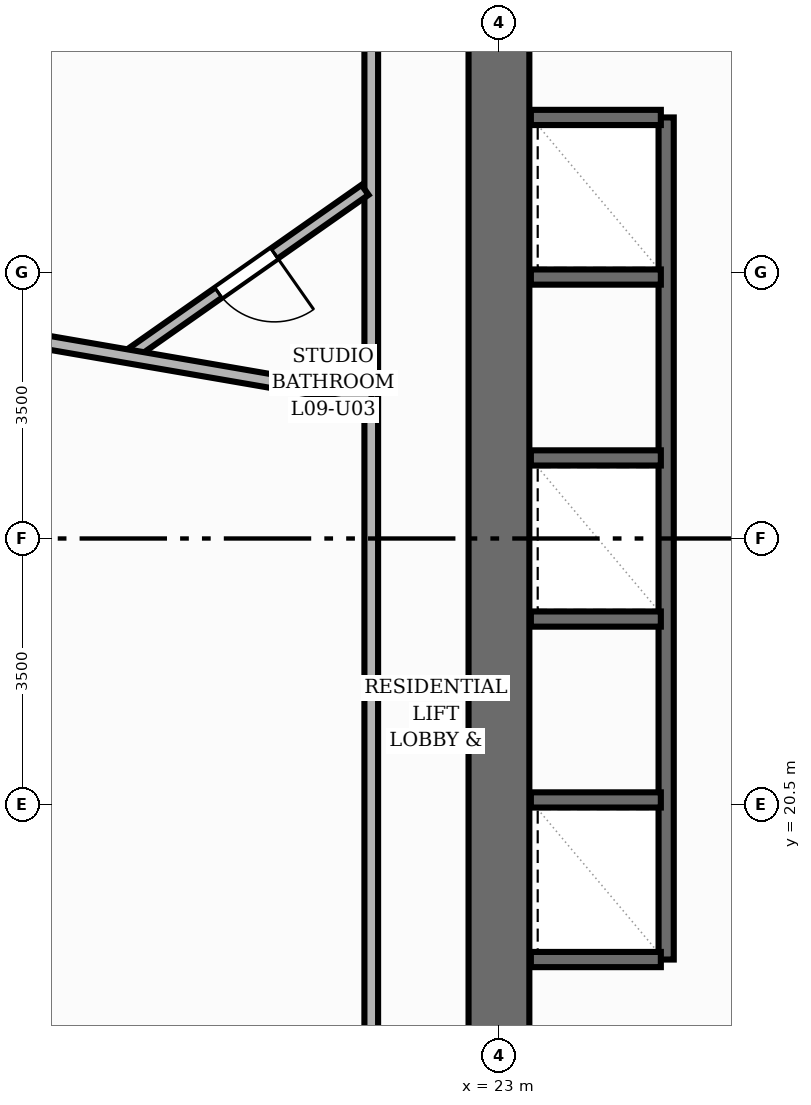
"""IFC4 building model, lengths in metres.
Left out: names, types, materials, properties, quantities, classifications, styles, units other than length and angle.
Written with IfcOpenShell. Run it as: python <this file> out.ifc"""

import sys

from ifc_helpers import new_model, si_unit, direction, frame, frame_2d, origin, place, context, subcontext, project, spatial, rectangle, extrude, element, fill, save


model = new_model("IFC4")
c1 = context("Model", 3, precision=1e-05, world=origin(), true_north=direction((0.0, 1.0)))
c2 = subcontext(c1, "Body", "Model", "MODEL_VIEW")
j1 = project(units=[si_unit("LENGTHUNIT", "METRE"), si_unit("PLANEANGLEUNIT", "RADIAN")], contexts=[c1])
p1 = place(None, origin())
s1 = spatial("IfcSite", under=j1, at=p1, CompositionType="ELEMENT")
p2 = place(p1, origin())
s2 = spatial("IfcBuilding", under=s1, at=p2, CompositionType="ELEMENT")
p3 = place(p2, frame((0.0, 0.0, 34.4)))
s3 = spatial("IfcBuildingStorey", under=s2, at=p3, CompositionType="ELEMENT", Elevation=34.4)
p4 = place(p3, frame((23.0, 17.4, 0.0), z_axis=(0.0, 0.0, 1.0), x_axis=(0.0, 1.0, 0.0)))
e1 = element("IfcWall", 1, at=p4, inside=s3, PredefinedType="SHEAR", context=c2, shape_type="SweptSolid", body=[
    extrude(rectangle(XDim=13.2, YDim=0.8, at=frame_2d((6.6, 0.0))), origin(), (0.0, 0.0, 1.0), 3.2),
])
p5 = place(p3, frame((25.2, 18.46, 0.0), z_axis=(0.0, 0.0, 1.0), x_axis=(0.0, 1.0, 0.0)))
e2 = element("IfcWall", 2, at=p5, inside=s3, PredefinedType="SHEAR", context=c2, shape_type="SweptSolid", body=[
    extrude(rectangle(XDim=11.08, YDim=0.2, at=frame_2d((5.54, 0.0))), origin(), (0.0, 0.0, 1.0), 3.2),
])
for number, where, z_axis, x_axis in (
    (3, (23.42, 18.46, 0.0), (0.0, 0.0, 1.0), (1.0, 0.0, 0.0)),
    (4, (23.42, 29.54, 0.0), (0.0, 0.0, 1.0), (1.0, 0.0, 0.0)),
    (5, (23.42, 20.56, 0.0), (0.0, 0.0, 1.0), (1.0, 0.0, 0.0)),
    (6, (23.42, 22.94, 0.0), (0.0, 0.0, 1.0), (1.0, 0.0, 0.0)),
    (7, (23.42, 25.06, 0.0), (0.0, 0.0, 1.0), (1.0, 0.0, 0.0)),
    (8, (23.42, 27.44, 0.0), (0.0, 0.0, 1.0), (1.0, 0.0, 0.0)),
):
    element("IfcWall", number, at=place(p3, frame(where, z_axis=z_axis, x_axis=x_axis)), inside=s3, PredefinedType="SHEAR", context=c2, shape_type="SweptSolid", body=[
        extrude(rectangle(XDim=1.71, YDim=0.2, at=frame_2d((0.855, 0.0))), origin(), (0.0, 0.0, 1.0), 3.2),
    ])
p6 = place(p3, frame((21.32, 15.32, 0.0), z_axis=(0.0, 0.0, 1.0), x_axis=(0.0, 1.0, 0.0)))
e9 = element("IfcWall", 9, at=p6, inside=s3, PredefinedType="PARTITIONING", context=c2, shape_type="SweptSolid", body=[
    extrude(rectangle(XDim=17.36, YDim=0.18, at=frame_2d((8.68, 0.0))), origin(), (0.0, 0.0, 1.0), 2.955),
])
p7 = place(p3, frame((21.238, 28.587, 0.0), z_axis=(0.0, 0.0, 1.0), x_axis=(-0.818554579869, -0.57442875953, 0.0)))
e10 = element("IfcWall", 10, at=p7, inside=s3, PredefinedType="PLUMBINGWALL", context=c2, shape_type="SweptSolid", body=[
    extrude(rectangle(XDim=3.813, YDim=0.16, at=frame_2d((1.907, 0.0))), origin(), (0.0, 0.0, 1.0), 2.955),
])
p8 = place(p7, frame((1.457, 0.0, 0.0)))
e11 = element("IfcOpeningElement", 11, at=p8, cuts=e10, PredefinedType="OPENING", context=c2, shape_type="SweptSolid", body=[
    extrude(rectangle(XDim=0.9, YDim=2.1, at=frame_2d((0.45, 1.05))), frame((0.0, 0.09, 0.0), z_axis=(0.0, -1.0, 0.0), x_axis=(1.0, 0.0, 0.0)), (0.0, 0.0, 1.0), 0.18),
])
p9 = place(p3, frame((21.32, 25.844, 0.0), z_axis=(0.0, 0.0, 1.0), x_axis=(-0.985428411656, 0.170090697865, 0.0)))
e12 = element("IfcWall", 12, at=p9, inside=s3, PredefinedType="PARTITIONING", context=c2, shape_type="SweptSolid", body=[
    extrude(rectangle(XDim=5.694, YDim=0.18, at=frame_2d((2.847, 0.0))), origin(), (0.0, 0.0, 1.0), 2.178),
])
p10 = place(p8, origin())
e13 = element("IfcDoor", 13, at=p10, inside=s3, OperationType="SINGLE_SWING_LEFT", PredefinedType="DOOR", context=c2, shape_type="SweptSolid", body=[
    extrude(rectangle(XDim=0.9, YDim=2.1, at=frame_2d((0.45, 1.05))), frame((0.0, 0.025, 0.0), z_axis=(0.0, -1.0, 0.0), x_axis=(1.0, 0.0, 0.0)), (0.0, 0.0, 1.0), 0.05),
])
fill(e11, e13)
save(model, sys.argv[1])
